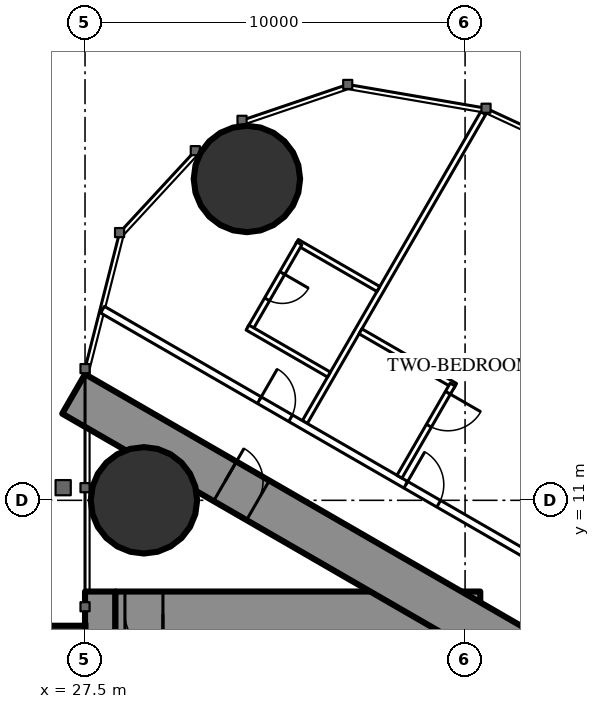
"""IFC4 building model, lengths in metres.
Left out: names, types, materials, properties, quantities, classifications, styles, units other than length and angle.
Written with IfcOpenShell. Run it as: python <this file> out.ifc"""

import sys

from ifc_helpers import new_model, si_unit, direction, frame, frame_2d, origin, origin_2d, place, context, subcontext, project, spatial, rectangle, circle, extrude, element, fill, save


model = new_model("IFC4")
c1 = context("Model", 3, precision=1e-05, world=origin(), true_north=direction((0.0, 1.0)))
c2 = subcontext(c1, "Body", "Model", "MODEL_VIEW")
j1 = project(units=[si_unit("LENGTHUNIT", "METRE"), si_unit("PLANEANGLEUNIT", "RADIAN")], contexts=[c1])
p1 = place(None, origin())
s1 = spatial("IfcSite", under=j1, at=p1, CompositionType="ELEMENT")
p2 = place(p1, origin())
s2 = spatial("IfcBuilding", under=s1, at=p2, CompositionType="ELEMENT")
p3 = place(p2, frame((0.0, 0.0, 191.3)))
s3 = spatial("IfcBuildingStorey", under=s2, at=p3, CompositionType="ELEMENT", Elevation=191.3)
for number, where, z_axis, x_axis in (
    (1, (31.76, 19.456, 0.0), (0.0, 0.0, 1.0), (1.0, 0.0, 0.0)),
    (2, (29.05, 11.0, 0.0), (0.0, 0.0, 1.0), (1.0, 0.0, 0.0)),
):
    element("IfcColumn", number, at=place(p3, frame(where, z_axis=z_axis, x_axis=x_axis)), inside=s3, PredefinedType="COLUMN", context=c2, shape_type="SweptSolid", body=[
        extrude(circle(Radius=1.4, at=origin_2d()), origin(), (0.0, 0.0, 1.0), 3.5),
    ])
p4 = place(p3, frame((27.9, -8.6, 0.0), z_axis=(0.0, 0.0, 1.0), x_axis=(0.0, 1.0, 0.0)))
e3 = element("IfcWall", 3, at=p4, inside=s3, PredefinedType="SHEAR", context=c2, shape_type="SweptSolid", body=[
    extrude(rectangle(XDim=17.2, YDim=0.8, at=frame_2d((8.6, 0.0))), origin(), (0.0, 0.0, 1.0), 3.5),
])
p5 = place(p4, frame((2.45, 0.0, 0.6)))
e4 = element("IfcOpeningElement", 4, at=p5, cuts=e3, PredefinedType="OPENING", context=c2, shape_type="SweptSolid", body=[
    extrude(rectangle(XDim=0.6, YDim=2.1, at=frame_2d((0.3, 1.05))), frame((0.0, 0.41, 0.0), z_axis=(0.0, -1.0, 0.0), x_axis=(1.0, 0.0, 0.0)), (0.0, 0.0, 1.0), 0.82),
])
p6 = place(p4, frame((14.15, 0.0, 0.6)))
e5 = element("IfcOpeningElement", 5, at=p6, cuts=e3, PredefinedType="OPENING", context=c2, shape_type="SweptSolid", body=[
    extrude(rectangle(XDim=0.6, YDim=2.1, at=frame_2d((0.3, 1.05))), frame((0.0, 0.41, 0.0), z_axis=(0.0, -1.0, 0.0), x_axis=(1.0, 0.0, 0.0)), (0.0, 0.0, 1.0), 0.82),
])
p7 = place(p3, frame((37.3, -8.6, 0.0), z_axis=(0.0, 0.0, 1.0), x_axis=(0.0, 1.0, 0.0)))
e6 = element("IfcWall", 6, at=p7, inside=s3, PredefinedType="SHEAR", context=c2, shape_type="SweptSolid", body=[
    extrude(rectangle(XDim=17.2, YDim=1.2, at=frame_2d((8.6, 0.0))), origin(), (0.0, 0.0, 1.0), 3.5),
])
p8 = place(p7, frame((7.7, 0.0, 0.0)))
e7 = element("IfcOpeningElement", 7, at=p8, cuts=e6, PredefinedType="OPENING", context=c2, shape_type="SweptSolid", body=[
    extrude(rectangle(XDim=1.8, YDim=2.2, at=frame_2d((0.9, 1.1))), frame((0.0, 0.61, 0.0), z_axis=(0.0, -1.0, 0.0), x_axis=(1.0, 0.0, 0.0)), (0.0, 0.0, 1.0), 1.22),
])
p9 = place(p3, frame((28.3, 8.0, 0.0), z_axis=(0.0, 0.0, 1.0), x_axis=(1.0, 0.0, 0.0)))
e8 = element("IfcWall", 8, at=p9, inside=s3, PredefinedType="SHEAR", context=c2, shape_type="SweptSolid", body=[
    extrude(rectangle(XDim=8.4, YDim=1.2, at=frame_2d((4.2, 0.0))), origin(), (0.0, 0.0, 1.0), 3.5),
])
p10 = place(p9, frame((0.25, 0.0, 0.0)))
e9 = element("IfcOpeningElement", 9, at=p10, cuts=e8, PredefinedType="OPENING", context=c2, shape_type="SweptSolid", body=[
    extrude(rectangle(XDim=1.0, YDim=2.2, at=frame_2d((0.5, 1.1))), frame((0.0, 0.61, 0.0), z_axis=(0.0, -1.0, 0.0), x_axis=(1.0, 0.0, 0.0)), (0.0, 0.0, 1.0), 1.22),
])
p11 = place(p3, frame((27.2, 13.8, 0.0), z_axis=(0.0, 0.0, 1.0), x_axis=(0.866024515034, -0.500001539357, 0.0)))
e10 = element("IfcWall", 10, at=p11, inside=s3, PredefinedType="SHEAR", context=c2, shape_type="SweptSolid", body=[
    extrude(rectangle(XDim=26.907, YDim=1.2, at=frame_2d((13.454, 0.0))), origin(), (0.0, 0.0, 1.0), 3.5),
])
p12 = place(p11, frame((4.6, 0.0, 0.0)))
e11 = element("IfcOpeningElement", 11, at=p12, cuts=e10, PredefinedType="OPENING", context=c2, shape_type="SweptSolid", body=[
    extrude(rectangle(XDim=1.0, YDim=2.2, at=frame_2d((0.5, 1.1))), frame((0.0, 0.61, 0.0), z_axis=(0.0, -1.0, 0.0), x_axis=(1.0, 0.0, 0.0)), (0.0, 0.0, 1.0), 1.22),
])
p13 = place(p11, frame((13.395, 0.0, 0.0)))
e12 = element("IfcOpeningElement", 12, at=p13, cuts=e10, PredefinedType="OPENING", context=c2, shape_type="SweptSolid", body=[
    extrude(rectangle(XDim=1.8, YDim=2.2, at=frame_2d((0.9, 1.1))), frame((0.0, 0.61, 0.0), z_axis=(0.0, -1.0, 0.0), x_axis=(1.0, 0.0, 0.0)), (0.0, 0.0, 1.0), 1.22),
])
p14 = place(p3, frame((33.284, 13.059, 0.0), z_axis=(0.0, 0.0, 1.0), x_axis=(0.499985904184, 0.866033541855, 0.0)))
e13 = element("IfcWall", 13, at=p14, inside=s3, PredefinedType="PARTITIONING", context=c2, shape_type="SweptSolid", body=[
    extrude(rectangle(XDim=9.385, YDim=0.15, at=frame_2d((4.693, 0.0))), origin(), (0.0, 0.0, 1.0), 3.25),
])
p15 = place(p3, frame((27.959, 16.017, 0.0), z_axis=(0.0, 0.0, 1.0), x_axis=(0.866024165033, -0.500002145574, 0.0)))
e14 = element("IfcWall", 14, at=p15, inside=s3, PredefinedType="PARTITIONING", context=c2, shape_type="SweptSolid", body=[
    extrude(rectangle(XDim=14.709, YDim=0.2, at=frame_2d((7.354, 0.0))), origin(), (0.0, 0.0, 1.0), 3.25),
])
p16 = place(p15, frame((9.215, 0.0, 0.0)))
e15 = element("IfcOpeningElement", 15, at=p16, cuts=e14, PredefinedType="OPENING", context=c2, shape_type="SweptSolid", body=[
    extrude(rectangle(XDim=1.0, YDim=2.2, at=frame_2d((0.5, 1.1))), frame((0.0, 0.11, 0.0), z_axis=(0.0, -1.0, 0.0), x_axis=(1.0, 0.0, 0.0)), (0.0, 0.0, 1.0), 0.22),
])
p17 = place(p15, frame((4.765, 0.0, 0.0)))
e16 = element("IfcOpeningElement", 16, at=p17, cuts=e14, PredefinedType="OPENING", context=c2, shape_type="SweptSolid", body=[
    extrude(rectangle(XDim=0.95, YDim=2.2, at=frame_2d((0.475, 1.1))), frame((0.0, 0.11, 0.0), z_axis=(0.0, -1.0, 0.0), x_axis=(1.0, 0.0, 0.0)), (0.0, 0.0, 1.0), 0.22),
])
p18 = place(p3, frame((34.749, 15.446, 0.0), z_axis=(0.0, 0.0, 1.0), x_axis=(0.866018712932, -0.500011588718, 0.0)))
e17 = element("IfcWall", 17, at=p18, inside=s3, PredefinedType="PARTITIONING", context=c2, shape_type="SweptSolid", body=[
    extrude(rectangle(XDim=2.875, YDim=0.15, at=frame_2d((1.438, 0.0))), origin(), (0.0, 0.0, 1.0), 3.25),
])
p19 = place(p3, frame((35.773, 11.621, 0.0), z_axis=(0.0, 0.0, 1.0), x_axis=(0.49998411664, 0.866034573852, 0.0)))
e18 = element("IfcWall", 18, at=p19, inside=s3, PredefinedType="PARTITIONING", context=c2, shape_type="SweptSolid", body=[
    extrude(rectangle(XDim=2.8, YDim=0.15, at=frame_2d((1.4, 0.0))), origin(), (0.0, 0.0, 1.0), 3.25),
])
p20 = place(p19, frame((1.55, 0.0, 0.0)))
e19 = element("IfcOpeningElement", 19, at=p20, cuts=e18, PredefinedType="OPENING", context=c2, shape_type="SweptSolid", body=[
    extrude(rectangle(XDim=1.0, YDim=2.2, at=frame_2d((0.5, 1.1))), frame((0.0, 0.085, 0.0), z_axis=(0.0, -1.0, 0.0), x_axis=(1.0, 0.0, 0.0)), (0.0, 0.0, 1.0), 0.17),
])
p21 = place(p3, frame((33.075, 17.798, 0.0), z_axis=(0.0, 0.0, 1.0), x_axis=(0.866006523861, -0.500032699561, 0.0)))
e20 = element("IfcWall", 20, at=p21, inside=s3, PredefinedType="PARTITIONING", context=c2, shape_type="SweptSolid", body=[
    extrude(rectangle(XDim=2.475, YDim=0.15, at=frame_2d((1.237, 0.0))), origin(), (0.0, 0.0, 1.0), 3.25),
])
p22 = place(p3, frame((31.84, 15.509, 0.0), z_axis=(0.0, 0.0, 1.0), x_axis=(0.500006934395, 0.866021400173, 0.0)))
e21 = element("IfcWall", 21, at=p22, inside=s3, PredefinedType="PARTITIONING", context=c2, shape_type="SweptSolid", body=[
    extrude(rectangle(XDim=2.6, YDim=0.15, at=frame_2d((1.3, 0.0))), origin(), (0.0, 0.0, 1.0), 3.25),
])
p23 = place(p22, frame((0.9, 0.0, 0.0)))
e22 = element("IfcOpeningElement", 22, at=p23, cuts=e21, PredefinedType="OPENING", context=c2, shape_type="SweptSolid", body=[
    extrude(rectangle(XDim=0.8, YDim=2.2, at=frame_2d((0.4, 1.1))), frame((0.0, 0.085, 0.0), z_axis=(0.0, -1.0, 0.0), x_axis=(1.0, 0.0, 0.0)), (0.0, 0.0, 1.0), 0.17),
])
p24 = place(p3, frame((31.775, 15.546, 0.0), z_axis=(0.0, 0.0, 1.0), x_axis=(0.866031185235, -0.4999899861, 0.0)))
e23 = element("IfcWall", 23, at=p24, inside=s3, PredefinedType="PARTITIONING", context=c2, shape_type="SweptSolid", body=[
    extrude(rectangle(XDim=2.475, YDim=0.15, at=frame_2d((1.238, 0.0))), origin(), (0.0, 0.0, 1.0), 3.25),
])
p25 = place(p20, origin())
e24 = element("IfcDoor", 24, at=p25, inside=s3, OperationType="SINGLE_SWING_RIGHT", PredefinedType="DOOR", context=c2, shape_type="SweptSolid", body=[
    extrude(rectangle(XDim=1.0, YDim=2.2, at=frame_2d((0.5, 1.1))), frame((0.0, 0.025, 0.0), z_axis=(0.0, -1.0, 0.0), x_axis=(1.0, 0.0, 0.0)), (0.0, 0.0, 1.0), 0.05),
])
fill(e19, e24)
p26 = place(p16, origin())
e25 = element("IfcDoor", 25, at=p26, inside=s3, OperationType="SINGLE_SWING_LEFT", PredefinedType="DOOR", context=c2, shape_type="SweptSolid", body=[
    extrude(rectangle(XDim=1.0, YDim=2.2, at=frame_2d((0.5, 1.1))), frame((0.0, 0.025, 0.0), z_axis=(0.0, -1.0, 0.0), x_axis=(1.0, 0.0, 0.0)), (0.0, 0.0, 1.0), 0.05),
])
fill(e15, e25)
p27 = place(p23, origin())
e26 = element("IfcDoor", 26, at=p27, inside=s3, OperationType="SINGLE_SWING_RIGHT", PredefinedType="DOOR", context=c2, shape_type="SweptSolid", body=[
    extrude(rectangle(XDim=0.8, YDim=2.2, at=frame_2d((0.4, 1.1))), frame((0.0, 0.025, 0.0), z_axis=(0.0, -1.0, 0.0), x_axis=(1.0, 0.0, 0.0)), (0.0, 0.0, 1.0), 0.05),
])
fill(e22, e26)
p28 = place(p17, origin())
e27 = element("IfcDoor", 27, at=p28, inside=s3, OperationType="SINGLE_SWING_LEFT", PredefinedType="DOOR", context=c2, shape_type="SweptSolid", body=[
    extrude(rectangle(XDim=0.95, YDim=2.2, at=frame_2d((0.475, 1.1))), frame((0.0, 0.025, 0.0), z_axis=(0.0, -1.0, 0.0), x_axis=(1.0, 0.0, 0.0)), (0.0, 0.0, 1.0), 0.05),
])
fill(e16, e27)
p29 = place(p12, origin())
e28 = element("IfcDoor", 28, at=p29, inside=s3, OperationType="SINGLE_SWING_LEFT", PredefinedType="DOOR", context=c2, shape_type="SweptSolid", body=[
    extrude(rectangle(XDim=1.0, YDim=2.2, at=frame_2d((0.5, 1.1))), frame((0.0, 0.025, 0.0), z_axis=(0.0, -1.0, 0.0), x_axis=(1.0, 0.0, 0.0)), (0.0, 0.0, 1.0), 0.05),
])
fill(e11, e28)
p30 = place(p10, origin())
e29 = element("IfcDoor", 29, at=p30, inside=s3, OperationType="SINGLE_SWING_RIGHT", PredefinedType="DOOR", context=c2, shape_type="SweptSolid", body=[
    extrude(rectangle(XDim=1.0, YDim=2.2, at=frame_2d((0.5, 1.1))), frame((0.0, 0.025, 0.0), z_axis=(0.0, -1.0, 0.0), x_axis=(1.0, 0.0, 0.0)), (0.0, 0.0, 1.0), 0.05),
])
fill(e9, e29)
save(model, sys.argv[1])
